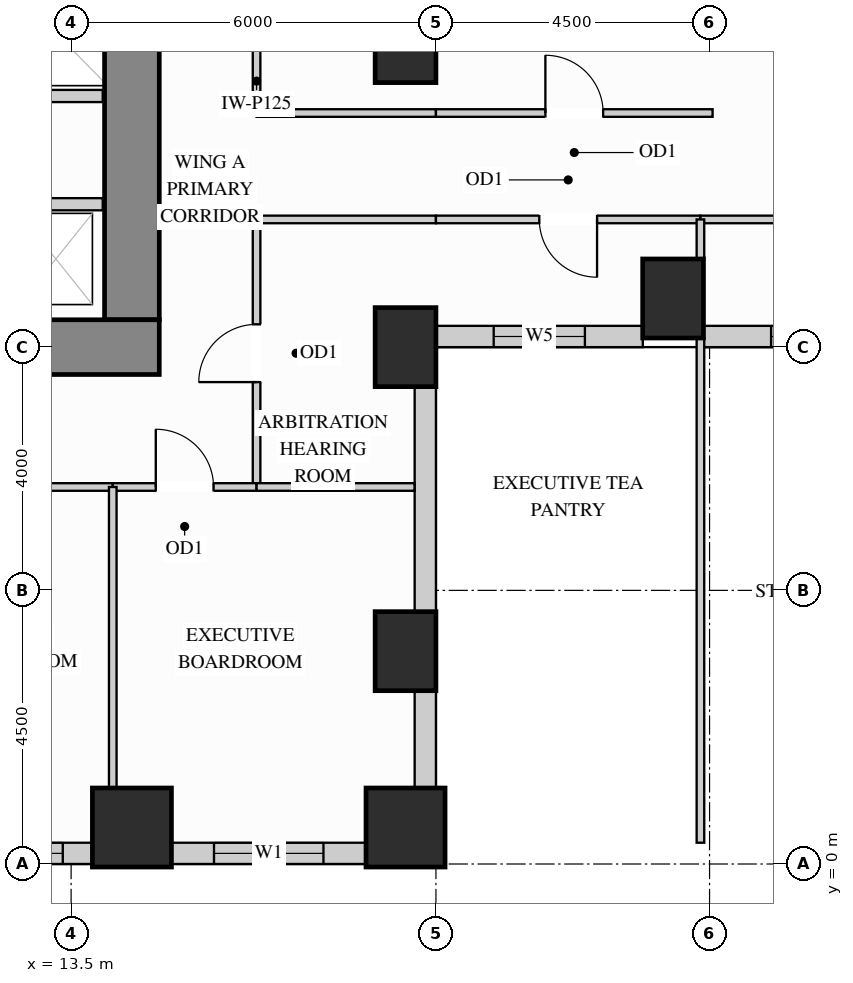
"""IFC4 building model, lengths in metres.
Left out: names, types, materials, properties, quantities, classifications, styles, units other than length and angle.
Written with IfcOpenShell. Run it as: python <this file> out.ifc"""

import sys

from ifc_helpers import new_model, si_unit, direction, frame, frame_2d, origin, origin_2d, place, context, subcontext, project, spatial, rectangle, extrude, source, transform, mapped, element, fill, save


model = new_model("IFC4")
c1 = context("Model", 3, precision=1e-05, world=origin(), true_north=direction((0.0, 1.0)))
c2 = subcontext(c1, "Body", "Model", "MODEL_VIEW")
j1 = project(units=[si_unit("LENGTHUNIT", "METRE"), si_unit("PLANEANGLEUNIT", "RADIAN")], contexts=[c1])
p1 = place(None, origin())
s1 = spatial("IfcSite", under=j1, at=p1, CompositionType="ELEMENT")
p2 = place(p1, origin())
s2 = spatial("IfcBuilding", under=s1, at=p2, CompositionType="ELEMENT")
p3 = place(p2, frame((0.0, 0.0, 69.3)))
s3 = spatial("IfcBuildingStorey", under=s2, at=p3, CompositionType="ELEMENT", Elevation=69.3)
m1 = source(origin(), c2, "Body", "SweptSolid", [
    extrude(rectangle(XDim=1.0, YDim=1.3, at=origin_2d()), origin(), (0.0, 0.0, 1.0), 3.32),
])
for number, where, z_axis, x_axis in (
    (1, (19.0, 13.5, 0.0), (0.0, 0.0, 1.0), (1.0, 0.0, 0.0)),
    (2, (19.0, 3.5, 0.0), (0.0, 0.0, 1.0), (1.0, 0.0, 0.0)),
    (3, (19.0, 8.5, 0.0), (0.0, 0.0, 1.0), (1.0, 0.0, 0.0)),
    (4, (23.4, 9.3, 0.0), (0.0, 0.0, 1.0), (1.0, 0.0, 0.0)),
):
    element("IfcColumn", number, at=place(p3, frame(where, z_axis=z_axis, x_axis=x_axis)), inside=s3, PredefinedType="COLUMN", context=c2, shape_type="MappedRepresentation", body=[
        mapped(m1, transform((0.0, 0.0, 0.0), x_axis=(1.0, 0.0, 0.0), y_axis=(0.0, 1.0, 0.0), z_axis=(0.0, 0.0, 1.0))),
    ])
m2 = source(origin(), c2, "Body", "SweptSolid", [
    extrude(rectangle(XDim=1.3, YDim=1.3, at=origin_2d()), origin(), (0.0, 0.0, 1.0), 3.32),
])
for number, where, z_axis, x_axis in (
    (5, (14.5, 0.6, 0.0), (0.0, 0.0, 1.0), (1.0, 0.0, 0.0)),
    (6, (19.0, 0.6, 0.0), (0.0, 0.0, 1.0), (1.0, 0.0, 0.0)),
):
    element("IfcColumn", number, at=place(p3, frame(where, z_axis=z_axis, x_axis=x_axis)), inside=s3, PredefinedType="COLUMN", context=c2, shape_type="MappedRepresentation", body=[
        mapped(m2, transform((0.0, 0.0, 0.0), x_axis=(1.0, 0.0, 0.0), y_axis=(0.0, 1.0, 0.0), z_axis=(0.0, 0.0, 1.0))),
    ])
m3 = source(origin(), c2, "Body", "SweptSolid", [
    extrude(rectangle(XDim=9.87, YDim=0.9, at=frame_2d((4.935, 0.0))), origin(), (0.0, 0.0, 1.0), 3.32),
])
p4 = place(p3, frame((14.5, 8.95, 0.0), z_axis=(0.0, 0.0, 1.0), x_axis=(0.0, 1.0, 0.0)))
e7 = element("IfcWall", 7, at=p4, inside=s3, PredefinedType="SHEAR", context=c2, shape_type="MappedRepresentation", body=[
    mapped(m3, transform((0.0, 0.0, 0.0), x_axis=(1.0, 0.0, 0.0), y_axis=(0.0, 1.0, 0.0), z_axis=(0.0, 0.0, 1.0))),
])
m4 = source(origin(), c2, "Body", "SweptSolid", [
    extrude(rectangle(XDim=10.9, YDim=0.9, at=frame_2d((5.45, 0.0))), origin(), (0.0, 0.0, 1.0), 3.32),
])
p5 = place(p3, frame((4.05, 8.5, 0.0), z_axis=(0.0, 0.0, 1.0), x_axis=(1.0, 0.0, 0.0)))
e8 = element("IfcWall", 8, at=p5, inside=s3, PredefinedType="SHEAR", context=c2, shape_type="MappedRepresentation", body=[
    mapped(m4, transform((0.0, 0.0, 0.0), x_axis=(1.0, 0.0, 0.0), y_axis=(0.0, 1.0, 0.0), z_axis=(0.0, 0.0, 1.0))),
])
p6 = place(p3, frame((9.648, 0.175, 0.0), z_axis=(0.0, 0.0, 1.0), x_axis=(1.0, 0.0, 0.0)))
e9 = element("IfcWall", 9, at=p6, inside=s3, PredefinedType="SOLIDWALL", context=c2, shape_type="SweptSolid", body=[
    extrude(rectangle(XDim=4.204, YDim=0.35, at=frame_2d((2.102, 0.0))), origin(), (0.0, 0.0, 1.0), 2.45),
])
p7 = place(p6, frame((1.315, 0.0, 0.78)))
e10 = element("IfcOpeningElement", 10, at=p7, cuts=e9, PredefinedType="OPENING", context=c2, shape_type="SweptSolid", body=[
    extrude(rectangle(XDim=2.4, YDim=1.49, at=frame_2d((1.2, 0.745))), frame((0.0, 0.185, 0.0), z_axis=(0.0, -1.0, 0.0), x_axis=(1.0, 0.0, 0.0)), (0.0, 0.0, 1.0), 0.37),
])
p8 = place(p3, frame((15.148, 0.175, 0.0), z_axis=(0.0, 0.0, 1.0), x_axis=(1.0, 0.0, 0.0)))
e11 = element("IfcWall", 11, at=p8, inside=s3, PredefinedType="SOLIDWALL", context=c2, shape_type="SweptSolid", body=[
    extrude(rectangle(XDim=3.204, YDim=0.35, at=frame_2d((1.602, 0.0))), origin(), (0.0, 0.0, 1.0), 2.45),
])
p9 = place(p8, frame((0.702, 0.0, 0.78)))
e12 = element("IfcOpeningElement", 12, at=p9, cuts=e11, PredefinedType="OPENING", context=c2, shape_type="SweptSolid", body=[
    extrude(rectangle(XDim=1.8, YDim=1.49, at=frame_2d((0.9, 0.745))), frame((0.0, 0.185, 0.0), z_axis=(0.0, -1.0, 0.0), x_axis=(1.0, 0.0, 0.0)), (0.0, 0.0, 1.0), 0.37),
])
m5 = source(origin(), c2, "Body", "SweptSolid", [
    extrude(rectangle(XDim=1.604, YDim=0.35, at=frame_2d((0.802, 0.0))), origin(), (0.0, 0.0, 1.0), 2.45),
])
p10 = place(p3, frame((19.325, 1.248, 0.0), z_axis=(0.0, 0.0, 1.0), x_axis=(0.0, 1.0, 0.0)))
e13 = element("IfcWall", 13, at=p10, inside=s3, PredefinedType="SOLIDWALL", context=c2, shape_type="MappedRepresentation", body=[
    mapped(m5, transform((0.0, 0.0, 0.0), x_axis=(1.0, 0.0, 0.0), y_axis=(0.0, 1.0, 0.0), z_axis=(0.0, 0.0, 1.0))),
])
m6 = source(origin(), c2, "Body", "SweptSolid", [
    extrude(rectangle(XDim=3.704, YDim=0.35, at=frame_2d((1.852, 0.0))), origin(), (0.0, 0.0, 1.0), 2.45),
])
p11 = place(p3, frame((19.325, 4.148, 0.0), z_axis=(0.0, 0.0, 1.0), x_axis=(0.0, 1.0, 0.0)))
e14 = element("IfcWall", 14, at=p11, inside=s3, PredefinedType="SOLIDWALL", context=c2, shape_type="MappedRepresentation", body=[
    mapped(m6, transform((0.0, 0.0, 0.0), x_axis=(1.0, 0.0, 0.0), y_axis=(0.0, 1.0, 0.0), z_axis=(0.0, 0.0, 1.0))),
])
p12 = place(p3, frame((19.498, 8.675, 0.0), z_axis=(0.0, 0.0, 1.0), x_axis=(1.0, 0.0, 0.0)))
e15 = element("IfcWall", 15, at=p12, inside=s3, PredefinedType="SOLIDWALL", context=c2, shape_type="SweptSolid", body=[
    extrude(rectangle(XDim=3.404, YDim=0.35, at=frame_2d((1.702, 0.0))), origin(), (0.0, 0.0, 1.0), 3.305),
])
p13 = place(p12, frame((0.952, 0.0, 0.78)))
e16 = element("IfcOpeningElement", 16, at=p13, cuts=e15, PredefinedType="OPENING", context=c2, shape_type="SweptSolid", body=[
    extrude(rectangle(XDim=1.5, YDim=2.0, at=frame_2d((0.75, 1.0))), frame((0.0, 0.185, 0.0), z_axis=(0.0, -1.0, 0.0), x_axis=(1.0, 0.0, 0.0)), (0.0, 0.0, 1.0), 0.37),
])
p14 = place(p3, frame((23.898, 8.675, 0.0), z_axis=(0.0, 0.0, 1.0), x_axis=(1.0, 0.0, 0.0)))
e17 = element("IfcWall", 17, at=p14, inside=s3, PredefinedType="SOLIDWALL", context=c2, shape_type="SweptSolid", body=[
    extrude(rectangle(XDim=6.104, YDim=0.35, at=frame_2d((3.052, 0.0))), origin(), (0.0, 0.0, 1.0), 3.305),
])
p15 = place(p14, frame((1.114, 0.0, 0.78)))
e18 = element("IfcOpeningElement", 18, at=p15, cuts=e17, PredefinedType="OPENING", context=c2, shape_type="SweptSolid", body=[
    extrude(rectangle(XDim=1.5, YDim=2.0, at=frame_2d((0.75, 1.0))), frame((0.0, 0.185, 0.0), z_axis=(0.0, -1.0, 0.0), x_axis=(1.0, 0.0, 0.0)), (0.0, 0.0, 1.0), 0.37),
])
p16 = place(p14, frame((3.408, 0.0, 0.78)))
e19 = element("IfcOpeningElement", 19, at=p16, cuts=e17, PredefinedType="OPENING", context=c2, shape_type="SweptSolid", body=[
    extrude(rectangle(XDim=1.5, YDim=2.0, at=frame_2d((0.75, 1.0))), frame((0.0, 0.185, 0.0), z_axis=(0.0, -1.0, 0.0), x_axis=(1.0, 0.0, 0.0)), (0.0, 0.0, 1.0), 0.37),
])
p17 = place(p3, frame((16.55, 12.35, 0.0), z_axis=(0.0, 0.0, 1.0), x_axis=(0.0, 1.0, 0.0)))
e20 = element("IfcWall", 20, at=p17, inside=s3, PredefinedType="PARTITIONING", context=c2, shape_type="SweptSolid", body=[
    extrude(rectangle(XDim=3.25, YDim=0.125, at=frame_2d((1.625, 0.0))), origin(), (0.0, 0.0, 1.0), 3.305),
])
p18 = place(p17, frame((1.15, 0.0, 0.0)))
e21 = element("IfcOpeningElement", 21, at=p18, cuts=e20, PredefinedType="OPENING", context=c2, shape_type="SweptSolid", body=[
    extrude(rectangle(XDim=0.95, YDim=2.15, at=frame_2d((0.475, 1.075))), frame((0.0, 0.073, 0.0), z_axis=(0.0, -1.0, 0.0), x_axis=(1.0, 0.0, 0.0)), (0.0, 0.0, 1.0), 0.145),
])
p19 = place(p3, frame((16.55, 6.2, 0.0), z_axis=(0.0, 0.0, 1.0), x_axis=(0.0, 1.0, 0.0)))
e22 = element("IfcWall", 22, at=p19, inside=s3, PredefinedType="PARTITIONING", context=c2, shape_type="SweptSolid", body=[
    extrude(rectangle(XDim=4.4, YDim=0.125, at=frame_2d((2.2, 0.0))), origin(), (0.0, 0.0, 1.0), 3.305),
])
p20 = place(p19, frame((1.725, 0.0, 0.0)))
e23 = element("IfcOpeningElement", 23, at=p20, cuts=e22, PredefinedType="OPENING", context=c2, shape_type="SweptSolid", body=[
    extrude(rectangle(XDim=0.95, YDim=2.15, at=frame_2d((0.475, 1.075))), frame((0.0, 0.073, 0.0), z_axis=(0.0, -1.0, 0.0), x_axis=(1.0, 0.0, 0.0)), (0.0, 0.0, 1.0), 0.145),
])
m7 = source(origin(), c2, "Body", "SweptSolid", [
    extrude(rectangle(XDim=2.95, YDim=0.125, at=frame_2d((1.475, 0.0))), origin(), (0.0, 0.0, 1.0), 3.305),
])
p21 = place(p3, frame((16.55, 12.35, 0.0), z_axis=(0.0, 0.0, 1.0), x_axis=(1.0, 0.0, 0.0)))
e24 = element("IfcWall", 24, at=p21, inside=s3, PredefinedType="PARTITIONING", context=c2, shape_type="MappedRepresentation", body=[
    mapped(m7, transform((0.0, 0.0, 0.0), x_axis=(1.0, 0.0, 0.0), y_axis=(0.0, 1.0, 0.0), z_axis=(0.0, 0.0, 1.0))),
])
p22 = place(p3, frame((19.5, 12.35, 0.0), z_axis=(0.0, 0.0, 1.0), x_axis=(1.0, 0.0, 0.0)))
e25 = element("IfcWall", 25, at=p22, inside=s3, PredefinedType="PARTITIONING", context=c2, shape_type="SweptSolid", body=[
    extrude(rectangle(XDim=4.55, YDim=0.125, at=frame_2d((2.275, 0.0))), origin(), (0.0, 0.0, 1.0), 3.305),
])
p23 = place(p22, frame((1.8, 0.0, 0.0)))
e26 = element("IfcOpeningElement", 26, at=p23, cuts=e25, PredefinedType="OPENING", context=c2, shape_type="SweptSolid", body=[
    extrude(rectangle(XDim=0.95, YDim=2.15, at=frame_2d((0.475, 1.075))), frame((0.0, 0.073, 0.0), z_axis=(0.0, -1.0, 0.0), x_axis=(1.0, 0.0, 0.0)), (0.0, 0.0, 1.0), 0.145),
])
p24 = place(p3, frame((16.55, 10.6, 0.0), z_axis=(0.0, 0.0, 1.0), x_axis=(1.0, 0.0, 0.0)))
e27 = element("IfcWall", 27, at=p24, inside=s3, PredefinedType="PARTITIONING", context=c2, shape_type="MappedRepresentation", body=[
    mapped(m7, transform((0.0, 0.0, 0.0), x_axis=(1.0, 0.0, 0.0), y_axis=(0.0, 1.0, 0.0), z_axis=(0.0, 0.0, 1.0))),
])
p25 = place(p3, frame((19.5, 10.6, 0.0), z_axis=(0.0, 0.0, 1.0), x_axis=(1.0, 0.0, 0.0)))
e28 = element("IfcWall", 28, at=p25, inside=s3, PredefinedType="PARTITIONING", context=c2, shape_type="SweptSolid", body=[
    extrude(rectangle(XDim=4.35, YDim=0.125, at=frame_2d((2.175, 0.0))), origin(), (0.0, 0.0, 1.0), 3.305),
])
p26 = place(p25, frame((1.7, 0.0, 0.0)))
e29 = element("IfcOpeningElement", 29, at=p26, cuts=e28, PredefinedType="OPENING", context=c2, shape_type="SweptSolid", body=[
    extrude(rectangle(XDim=0.95, YDim=2.15, at=frame_2d((0.475, 1.075))), frame((0.0, 0.073, 0.0), z_axis=(0.0, -1.0, 0.0), x_axis=(1.0, 0.0, 0.0)), (0.0, 0.0, 1.0), 0.145),
])
p27 = place(p3, frame((23.85, 10.6, 0.0), z_axis=(0.0, 0.0, 1.0), x_axis=(1.0, 0.0, 0.0)))
e30 = element("IfcWall", 30, at=p27, inside=s3, PredefinedType="PARTITIONING", context=c2, shape_type="SweptSolid", body=[
    extrude(rectangle(XDim=6.0, YDim=0.125, at=frame_2d((3.0, 0.0))), origin(), (0.0, 0.0, 1.0), 3.305),
])
p28 = place(p27, frame((2.525, 0.0, 0.0)))
e31 = element("IfcOpeningElement", 31, at=p28, cuts=e30, PredefinedType="OPENING", context=c2, shape_type="SweptSolid", body=[
    extrude(rectangle(XDim=0.95, YDim=2.15, at=frame_2d((0.475, 1.075))), frame((0.0, 0.073, 0.0), z_axis=(0.0, -1.0, 0.0), x_axis=(1.0, 0.0, 0.0)), (0.0, 0.0, 1.0), 0.145),
])
m8 = source(origin(), c2, "Body", "SweptSolid", [
    extrude(rectangle(XDim=8.29, YDim=0.125, at=frame_2d((4.145, 0.0))), origin(), (0.0, 0.0, 1.0), 3.305),
])
p29 = place(p3, frame((23.85, 0.35, 0.0), z_axis=(0.0, 0.0, 1.0), x_axis=(0.0, 1.0, 0.0)))
e32 = element("IfcWall", 32, at=p29, inside=s3, PredefinedType="PARTITIONING", context=c2, shape_type="MappedRepresentation", body=[
    mapped(m8, transform((0.0, 0.0, 0.0), x_axis=(1.0, 0.0, 0.0), y_axis=(0.0, 1.0, 0.0), z_axis=(0.0, 0.0, 1.0))),
])
m9 = source(origin(), c2, "Body", "SweptSolid", [
    extrude(rectangle(XDim=0.64, YDim=0.125, at=frame_2d((0.32, 0.0))), origin(), (0.0, 0.0, 1.0), 3.305),
])
p30 = place(p3, frame((23.85, 9.96, 0.0), z_axis=(0.0, 0.0, 1.0), x_axis=(0.0, 1.0, 0.0)))
e33 = element("IfcWall", 33, at=p30, inside=s3, PredefinedType="PARTITIONING", context=c2, shape_type="MappedRepresentation", body=[
    mapped(m9, transform((0.0, 0.0, 0.0), x_axis=(1.0, 0.0, 0.0), y_axis=(0.0, 1.0, 0.0), z_axis=(0.0, 0.0, 1.0))),
])
p31 = place(p3, frame((10.544, 6.2, 0.0), z_axis=(0.0, 0.0, 1.0), x_axis=(1.0, 0.0, 0.0)))
e34 = element("IfcWall", 34, at=p31, inside=s3, PredefinedType="PARTITIONING", context=c2, shape_type="SweptSolid", body=[
    extrude(rectangle(XDim=3.641, YDim=0.125, at=frame_2d((1.821, 0.0))), origin(), (0.0, 0.0, 1.0), 2.768),
])
p32 = place(p31, frame((1.345, 0.0, 0.0)))
e35 = element("IfcOpeningElement", 35, at=p32, cuts=e34, PredefinedType="OPENING", context=c2, shape_type="SweptSolid", body=[
    extrude(rectangle(XDim=0.95, YDim=2.15, at=frame_2d((0.475, 1.075))), frame((0.0, 0.073, 0.0), z_axis=(0.0, -1.0, 0.0), x_axis=(1.0, 0.0, 0.0)), (0.0, 0.0, 1.0), 0.145),
])
p33 = place(p3, frame((14.185, 6.2, 0.0), z_axis=(0.0, 0.0, 1.0), x_axis=(1.0, 0.0, 0.0)))
e36 = element("IfcWall", 36, at=p33, inside=s3, PredefinedType="PARTITIONING", context=c2, shape_type="SweptSolid", body=[
    extrude(rectangle(XDim=2.365, YDim=0.125, at=frame_2d((1.183, 0.0))), origin(), (0.0, 0.0, 1.0), 2.768),
])
p34 = place(p33, frame((0.708, 0.0, 0.0)))
e37 = element("IfcOpeningElement", 37, at=p34, cuts=e36, PredefinedType="OPENING", context=c2, shape_type="SweptSolid", body=[
    extrude(rectangle(XDim=0.95, YDim=2.15, at=frame_2d((0.475, 1.075))), frame((0.0, 0.073, 0.0), z_axis=(0.0, -1.0, 0.0), x_axis=(1.0, 0.0, 0.0)), (0.0, 0.0, 1.0), 0.145),
])
m10 = source(origin(), c2, "Body", "SweptSolid", [
    extrude(rectangle(XDim=2.598, YDim=0.125, at=frame_2d((1.299, 0.0))), origin(), (0.0, 0.0, 1.0), 2.768),
])
p35 = place(p3, frame((16.55, 6.2, 0.0), z_axis=(0.0, 0.0, 1.0), x_axis=(1.0, 0.0, 0.0)))
e38 = element("IfcWall", 38, at=p35, inside=s3, PredefinedType="PARTITIONING", context=c2, shape_type="MappedRepresentation", body=[
    mapped(m10, transform((0.0, 0.0, 0.0), x_axis=(1.0, 0.0, 0.0), y_axis=(0.0, 1.0, 0.0), z_axis=(0.0, 0.0, 1.0))),
])
m11 = source(origin(), c2, "Body", "SweptSolid", [
    extrude(rectangle(XDim=4.94, YDim=0.125, at=frame_2d((2.47, 0.0))), origin(), (0.0, 0.0, 1.0), 3.305),
])
p36 = place(p3, frame((14.185, 1.26, 0.0), z_axis=(0.0, 0.0, 1.0), x_axis=(0.0, 1.0, 0.0)))
e39 = element("IfcWall", 39, at=p36, inside=s3, PredefinedType="PARTITIONING", context=c2, shape_type="MappedRepresentation", body=[
    mapped(m11, transform((0.0, 0.0, 0.0), x_axis=(1.0, 0.0, 0.0), y_axis=(0.0, 1.0, 0.0), z_axis=(0.0, 0.0, 1.0))),
])
m12 = source(origin(), c2, "Body", "SweptSolid", [
    extrude(rectangle(XDim=1.6, YDim=0.2, at=frame_2d((0.8, 0.0))), origin(), (0.0, 0.0, 1.0), 3.305),
])
p37 = place(p3, frame((12.42, 10.85, 0.0), z_axis=(0.0, 0.0, 1.0), x_axis=(1.0, 0.0, 0.0)))
e40 = element("IfcWall", 40, at=p37, inside=s3, PredefinedType="PARTITIONING", context=c2, shape_type="MappedRepresentation", body=[
    mapped(m12, transform((0.0, 0.0, 0.0), x_axis=(1.0, 0.0, 0.0), y_axis=(0.0, 1.0, 0.0), z_axis=(0.0, 0.0, 1.0))),
])
m13 = source(origin(), c2, "Body", "SweptSolid", [
    extrude(rectangle(XDim=1.79, YDim=0.2, at=frame_2d((0.895, 0.0))), origin(), (0.0, 0.0, 1.0), 3.305),
])
p38 = place(p3, frame((12.23, 12.63, 0.0), z_axis=(0.0, 0.0, 1.0), x_axis=(1.0, 0.0, 0.0)))
e41 = element("IfcWall", 41, at=p38, inside=s3, PredefinedType="PARTITIONING", context=c2, shape_type="MappedRepresentation", body=[
    mapped(m13, transform((0.0, 0.0, 0.0), x_axis=(1.0, 0.0, 0.0), y_axis=(0.0, 1.0, 0.0), z_axis=(0.0, 0.0, 1.0))),
])
m14 = source(origin(), c2, "Body", "SweptSolid", [
    extrude(rectangle(XDim=0.95, YDim=2.15, at=frame_2d((0.475, 1.075))), frame((0.0, 0.025, 0.0), z_axis=(0.0, -1.0, 0.0), x_axis=(1.0, 0.0, 0.0)), (0.0, 0.0, 1.0), 0.05),
])
p39 = place(p20, origin())
e42 = element("IfcDoor", 42, at=p39, inside=s3, OperationType="SINGLE_SWING_LEFT", PredefinedType="DOOR", context=c2, shape_type="MappedRepresentation", body=[
    mapped(m14, transform((0.0, 0.0, 0.0), x_axis=(1.0, 0.0, 0.0), y_axis=(0.0, 1.0, 0.0), z_axis=(0.0, 0.0, 1.0))),
])
fill(e23, e42)
p40 = place(p34, origin())
e43 = element("IfcDoor", 43, at=p40, inside=s3, OperationType="SINGLE_SWING_LEFT", PredefinedType="DOOR", context=c2, shape_type="MappedRepresentation", body=[
    mapped(m14, transform((0.0, 0.0, 0.0), x_axis=(1.0, 0.0, 0.0), y_axis=(0.0, 1.0, 0.0), z_axis=(0.0, 0.0, 1.0))),
])
fill(e37, e43)
p41 = place(p23, origin())
e44 = element("IfcDoor", 44, at=p41, inside=s3, OperationType="SINGLE_SWING_LEFT", PredefinedType="DOOR", context=c2, shape_type="MappedRepresentation", body=[
    mapped(m14, transform((0.0, 0.0, 0.0), x_axis=(1.0, 0.0, 0.0), y_axis=(0.0, 1.0, 0.0), z_axis=(0.0, 0.0, 1.0))),
])
fill(e26, e44)
p42 = place(p26, origin())
e45 = element("IfcDoor", 45, at=p42, inside=s3, OperationType="SINGLE_SWING_RIGHT", PredefinedType="DOOR", context=c2, shape_type="MappedRepresentation", body=[
    mapped(m14, transform((0.0, 0.0, 0.0), x_axis=(1.0, 0.0, 0.0), y_axis=(0.0, 1.0, 0.0), z_axis=(0.0, 0.0, 1.0))),
])
fill(e29, e45)
m15 = source(origin(), c2, "Body", "SweptSolid", [
    extrude(rectangle(XDim=1.8, YDim=1.49, at=frame_2d((0.9, 0.745))), frame((0.0, 0.03, 0.0), z_axis=(0.0, -1.0, 0.0), x_axis=(1.0, 0.0, 0.0)), (0.0, 0.0, 1.0), 0.06),
])
p43 = place(p9, origin())
e46 = element("IfcWindow", 46, at=p43, inside=s3, PartitioningType="SINGLE_PANEL", PredefinedType="WINDOW", context=c2, shape_type="MappedRepresentation", body=[
    mapped(m15, transform((0.0, 0.0, 0.0), x_axis=(1.0, 0.0, 0.0), y_axis=(0.0, 1.0, 0.0), z_axis=(0.0, 0.0, 1.0))),
])
fill(e12, e46)
m16 = source(origin(), c2, "Body", "SweptSolid", [
    extrude(rectangle(XDim=2.4, YDim=1.49, at=frame_2d((1.2, 0.745))), frame((0.0, 0.03, 0.0), z_axis=(0.0, -1.0, 0.0), x_axis=(1.0, 0.0, 0.0)), (0.0, 0.0, 1.0), 0.06),
])
p44 = place(p7, origin())
e47 = element("IfcWindow", 47, at=p44, inside=s3, PartitioningType="SINGLE_PANEL", PredefinedType="WINDOW", context=c2, shape_type="MappedRepresentation", body=[
    mapped(m16, transform((0.0, 0.0, 0.0), x_axis=(1.0, 0.0, 0.0), y_axis=(0.0, 1.0, 0.0), z_axis=(0.0, 0.0, 1.0))),
])
fill(e10, e47)
m17 = source(origin(), c2, "Body", "SweptSolid", [
    extrude(rectangle(XDim=1.5, YDim=2.0, at=frame_2d((0.75, 1.0))), frame((0.0, 0.03, 0.0), z_axis=(0.0, -1.0, 0.0), x_axis=(1.0, 0.0, 0.0)), (0.0, 0.0, 1.0), 0.06),
])
p45 = place(p13, origin())
e48 = element("IfcWindow", 48, at=p45, inside=s3, PartitioningType="SINGLE_PANEL", PredefinedType="WINDOW", context=c2, shape_type="MappedRepresentation", body=[
    mapped(m17, transform((0.0, 0.0, 0.0), x_axis=(1.0, 0.0, 0.0), y_axis=(0.0, 1.0, 0.0), z_axis=(0.0, 0.0, 1.0))),
])
fill(e16, e48)
p46 = place(p15, origin())
e49 = element("IfcWindow", 49, at=p46, inside=s3, PartitioningType="SINGLE_PANEL", PredefinedType="WINDOW", context=c2, shape_type="MappedRepresentation", body=[
    mapped(m17, transform((0.0, 0.0, 0.0), x_axis=(1.0, 0.0, 0.0), y_axis=(0.0, 1.0, 0.0), z_axis=(0.0, 0.0, 1.0))),
])
fill(e18, e49)
save(model, sys.argv[1])
